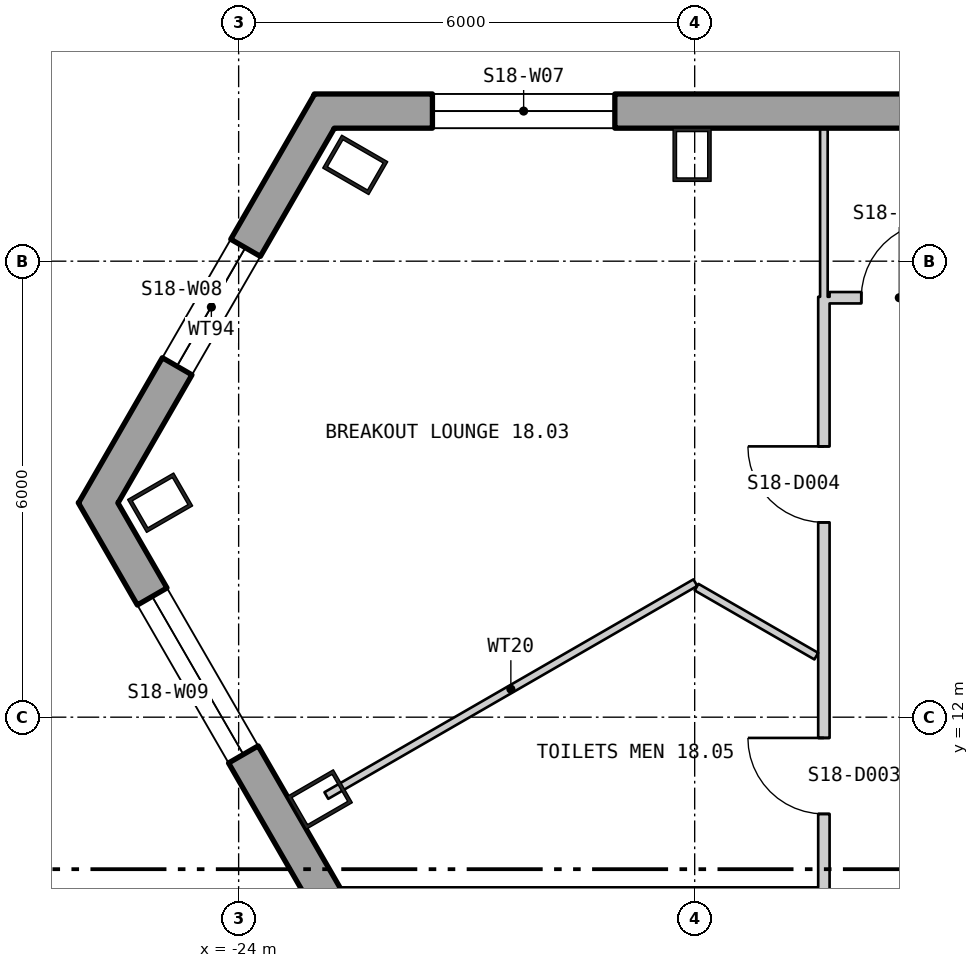
"""IFC4 building model, lengths in metres.
Left out: names, types, materials, properties, quantities, classifications, styles, units other than length and angle.
Written with IfcOpenShell. Run it as: python <this file> out.ifc"""

import sys

from ifc_helpers import new_model, si_unit, direction, frame, frame_2d, origin, origin_2d, place, context, subcontext, project, spatial, polyline, rectangle, hollow_rectangle, outline, extrude, element, fill, save


model = new_model("IFC4")
c1 = context("Model", 3, precision=1e-05, world=origin(), true_north=direction((0.0, 1.0)))
c2 = subcontext(c1, "Body", "Model", "MODEL_VIEW")
j1 = project(units=[si_unit("LENGTHUNIT", "METRE"), si_unit("PLANEANGLEUNIT", "RADIAN")], contexts=[c1])
p1 = place(None, origin())
s1 = spatial("IfcSite", under=j1, at=p1, CompositionType="ELEMENT")
p2 = place(p1, origin())
s2 = spatial("IfcBuilding", under=s1, at=p2, CompositionType="ELEMENT")
p3 = place(p2, frame((0.0, 0.0, 245.4)))
s3 = spatial("IfcBuildingStorey", under=s2, at=p3, CompositionType="ELEMENT", Elevation=245.4)
for number, where, z_axis, x_axis in (
    (1, (-18.034, 19.4, 0.0), (0.0, 0.0, 1.0), (-1.0, 0.0, 0.0)),
    (2, (-22.466, 19.267, 0.0), (0.0, 0.0, 1.0), (-0.5, -0.866, 0.0)),
    (3, (-25.033, 14.822, 0.0), (0.0, 0.0, 1.0), (0.5, -0.866, 0.0)),
    (4, (-22.932, 10.917, 0.0), (0.0, 0.0, 1.0), (0.5, -0.866, 0.0)),
):
    element("IfcColumn", number, at=place(p3, frame(where, z_axis=z_axis, x_axis=x_axis)), inside=s3, PredefinedType="COLUMN", context=c2, shape_type="SweptSolid", body=[
        extrude(hollow_rectangle(XDim=0.5, YDim=0.7, WallThickness=0.045, at=origin_2d()), origin(), (0.0, 0.0, 1.0), 3.9),
    ])
p4 = place(p3, frame((22.875, 19.975, -0.4), z_axis=(0.0, 0.0, 1.0), x_axis=(-1.0, 0.0, 0.0)))
e5 = element("IfcWall", 5, at=p4, inside=s3, PredefinedType="SOLIDWALL", context=c2, shape_type="SweptSolid", body=[
    extrude(outline(polyline([(-0.13, -0.225), (45.88, -0.225), (45.62, 0.225), (0.13, 0.225), (-0.13, -0.225)])), origin(), (0.0, 0.0, 1.0), 3.9),
])
p5 = place(p4, frame((1.425, 0.0, 1.3)))
e6 = element("IfcOpeningElement", 6, at=p5, cuts=e5, PredefinedType="OPENING", context=c2, shape_type="SweptSolid", body=[
    extrude(rectangle(XDim=2.4, YDim=2.0, at=frame_2d((1.2, 1.0))), frame((0.0, 0.235, 0.0), z_axis=(0.0, -1.0, 0.0), x_axis=(1.0, 0.0, 0.0)), (0.0, 0.0, 1.0), 0.47),
])
p6 = place(p4, frame((14.912, 0.0, 1.3)))
e7 = element("IfcOpeningElement", 7, at=p6, cuts=e5, PredefinedType="OPENING", context=c2, shape_type="SweptSolid", body=[
    extrude(rectangle(XDim=2.4, YDim=2.0, at=frame_2d((1.2, 1.0))), frame((0.0, 0.235, 0.0), z_axis=(0.0, -1.0, 0.0), x_axis=(1.0, 0.0, 0.0)), (0.0, 0.0, 1.0), 0.47),
])
p7 = place(p4, frame((19.421, 0.0, 1.3)))
e8 = element("IfcOpeningElement", 8, at=p7, cuts=e5, PredefinedType="OPENING", context=c2, shape_type="SweptSolid", body=[
    extrude(rectangle(XDim=2.4, YDim=2.0, at=frame_2d((1.2, 1.0))), frame((0.0, 0.235, 0.0), z_axis=(0.0, -1.0, 0.0), x_axis=(1.0, 0.0, 0.0)), (0.0, 0.0, 1.0), 0.47),
])
p8 = place(p4, frame((23.929, 0.0, 1.3)))
e9 = element("IfcOpeningElement", 9, at=p8, cuts=e5, PredefinedType="OPENING", context=c2, shape_type="SweptSolid", body=[
    extrude(rectangle(XDim=2.4, YDim=2.0, at=frame_2d((1.2, 1.0))), frame((0.0, 0.235, 0.0), z_axis=(0.0, -1.0, 0.0), x_axis=(1.0, 0.0, 0.0)), (0.0, 0.0, 1.0), 0.47),
])
p9 = place(p4, frame((28.438, 0.0, 1.3)))
e10 = element("IfcOpeningElement", 10, at=p9, cuts=e5, PredefinedType="OPENING", context=c2, shape_type="SweptSolid", body=[
    extrude(rectangle(XDim=2.4, YDim=2.0, at=frame_2d((1.2, 1.0))), frame((0.0, 0.235, 0.0), z_axis=(0.0, -1.0, 0.0), x_axis=(1.0, 0.0, 0.0)), (0.0, 0.0, 1.0), 0.47),
])
p10 = place(p4, frame((32.947, 0.0, 1.3)))
e11 = element("IfcOpeningElement", 11, at=p10, cuts=e5, PredefinedType="OPENING", context=c2, shape_type="SweptSolid", body=[
    extrude(rectangle(XDim=2.4, YDim=2.0, at=frame_2d((1.2, 1.0))), frame((0.0, 0.235, 0.0), z_axis=(0.0, -1.0, 0.0), x_axis=(1.0, 0.0, 0.0)), (0.0, 0.0, 1.0), 0.47),
])
p11 = place(p4, frame((41.925, 0.0, 1.3)))
e12 = element("IfcOpeningElement", 12, at=p11, cuts=e5, PredefinedType="OPENING", context=c2, shape_type="SweptSolid", body=[
    extrude(rectangle(XDim=2.4, YDim=2.0, at=frame_2d((1.2, 1.0))), frame((0.0, 0.235, 0.0), z_axis=(0.0, -1.0, 0.0), x_axis=(1.0, 0.0, 0.0)), (0.0, 0.0, 1.0), 0.47),
])
p12 = place(p3, frame((-22.871, 19.973, -0.4), z_axis=(0.0, 0.0, 1.0), x_axis=(-0.500001772576, -0.866024380385, 0.0)))
e13 = element("IfcWall", 13, at=p12, inside=s3, PredefinedType="SOLIDWALL", context=c2, shape_type="SweptSolid", body=[
    extrude(outline(polyline([(-0.13, -0.225), (6.08, -0.225), (5.82, 0.225), (0.13, 0.225), (-0.13, -0.225)])), origin(), (0.0, 0.0, 1.0), 3.9),
])
p13 = place(p12, frame((2.075, 0.0, 1.3)))
e14 = element("IfcOpeningElement", 14, at=p13, cuts=e13, PredefinedType="OPENING", context=c2, shape_type="SweptSolid", body=[
    extrude(rectangle(XDim=1.8, YDim=2.0, at=frame_2d((0.9, 1.0))), frame((0.0, 0.235, 0.0), z_axis=(0.0, -1.0, 0.0), x_axis=(1.0, 0.0, 0.0)), (0.0, 0.0, 1.0), 0.47),
])
p14 = place(p3, frame((-25.85, 14.822, -0.18), z_axis=(0.0, 0.0, 1.0), x_axis=(0.500000335318, -0.866025210188, 0.0)))
e15 = element("IfcWall", 15, at=p14, inside=s3, PredefinedType="SOLIDWALL", context=c2, shape_type="SweptSolid", body=[
    extrude(outline(polyline([(-0.13, -0.225), (45.88, -0.225), (45.62, 0.225), (0.13, 0.225), (-0.13, -0.225)])), origin(), (0.0, 0.0, 1.0), 3.68),
])
p15 = place(p14, frame((1.425, 0.0, 1.08)))
e16 = element("IfcOpeningElement", 16, at=p15, cuts=e15, PredefinedType="OPENING", context=c2, shape_type="SweptSolid", body=[
    extrude(rectangle(XDim=2.4, YDim=2.0, at=frame_2d((1.2, 1.0))), frame((0.0, 0.235, 0.0), z_axis=(0.0, -1.0, 0.0), x_axis=(1.0, 0.0, 0.0)), (0.0, 0.0, 1.0), 0.47),
])
p16 = place(p14, frame((10.403, 0.0, 1.08)))
e17 = element("IfcOpeningElement", 17, at=p16, cuts=e15, PredefinedType="OPENING", context=c2, shape_type="SweptSolid", body=[
    extrude(rectangle(XDim=2.4, YDim=2.0, at=frame_2d((1.2, 1.0))), frame((0.0, 0.235, 0.0), z_axis=(0.0, -1.0, 0.0), x_axis=(1.0, 0.0, 0.0)), (0.0, 0.0, 1.0), 0.47),
])
p17 = place(p14, frame((14.912, 0.0, 1.08)))
e18 = element("IfcOpeningElement", 18, at=p17, cuts=e15, PredefinedType="OPENING", context=c2, shape_type="SweptSolid", body=[
    extrude(rectangle(XDim=2.4, YDim=2.0, at=frame_2d((1.2, 1.0))), frame((0.0, 0.235, 0.0), z_axis=(0.0, -1.0, 0.0), x_axis=(1.0, 0.0, 0.0)), (0.0, 0.0, 1.0), 0.47),
])
p18 = place(p14, frame((19.421, 0.0, 1.08)))
e19 = element("IfcOpeningElement", 19, at=p18, cuts=e15, PredefinedType="OPENING", context=c2, shape_type="SweptSolid", body=[
    extrude(rectangle(XDim=2.4, YDim=2.0, at=frame_2d((1.2, 1.0))), frame((0.0, 0.235, 0.0), z_axis=(0.0, -1.0, 0.0), x_axis=(1.0, 0.0, 0.0)), (0.0, 0.0, 1.0), 0.47),
])
p19 = place(p14, frame((23.929, 0.0, 1.08)))
e20 = element("IfcOpeningElement", 20, at=p19, cuts=e15, PredefinedType="OPENING", context=c2, shape_type="SweptSolid", body=[
    extrude(rectangle(XDim=2.4, YDim=2.0, at=frame_2d((1.2, 1.0))), frame((0.0, 0.235, 0.0), z_axis=(0.0, -1.0, 0.0), x_axis=(1.0, 0.0, 0.0)), (0.0, 0.0, 1.0), 0.47),
])
p20 = place(p14, frame((28.438, 0.0, 1.08)))
e21 = element("IfcOpeningElement", 21, at=p20, cuts=e15, PredefinedType="OPENING", context=c2, shape_type="SweptSolid", body=[
    extrude(rectangle(XDim=2.4, YDim=2.0, at=frame_2d((1.2, 1.0))), frame((0.0, 0.235, 0.0), z_axis=(0.0, -1.0, 0.0), x_axis=(1.0, 0.0, 0.0)), (0.0, 0.0, 1.0), 0.47),
])
p21 = place(p14, frame((32.947, 0.0, 1.08)))
e22 = element("IfcOpeningElement", 22, at=p21, cuts=e15, PredefinedType="OPENING", context=c2, shape_type="SweptSolid", body=[
    extrude(rectangle(XDim=2.4, YDim=2.0, at=frame_2d((1.2, 1.0))), frame((0.0, 0.235, 0.0), z_axis=(0.0, -1.0, 0.0), x_axis=(1.0, 0.0, 0.0)), (0.0, 0.0, 1.0), 0.47),
])
p22 = place(p14, frame((37.455, 0.0, 1.08)))
e23 = element("IfcOpeningElement", 23, at=p22, cuts=e15, PredefinedType="OPENING", context=c2, shape_type="SweptSolid", body=[
    extrude(rectangle(XDim=2.4, YDim=2.0, at=frame_2d((1.2, 1.0))), frame((0.0, 0.235, 0.0), z_axis=(0.0, -1.0, 0.0), x_axis=(1.0, 0.0, 0.0)), (0.0, 0.0, 1.0), 0.47),
])
p23 = place(p14, frame((41.925, 0.0, 1.08)))
e24 = element("IfcOpeningElement", 24, at=p23, cuts=e15, PredefinedType="OPENING", context=c2, shape_type="SweptSolid", body=[
    extrude(rectangle(XDim=2.4, YDim=2.0, at=frame_2d((1.2, 1.0))), frame((0.0, 0.235, 0.0), z_axis=(0.0, -1.0, 0.0), x_axis=(1.0, 0.0, 0.0)), (0.0, 0.0, 1.0), 0.47),
])
p24 = place(p3, frame((-22.846, 10.969, 0.0), z_axis=(0.0, 0.0, 1.0), x_axis=(0.866182615826, 0.499727601839, 0.0)))
e25 = element("IfcWall", 25, at=p24, inside=s3, PredefinedType="PARTITIONING", context=c2, shape_type="SweptSolid", body=[
    extrude(rectangle(XDim=5.605, YDim=0.1, at=frame_2d((2.803, 0.0))), origin(), (0.0, 0.0, 1.0), 3.7),
])
p25 = place(p3, frame((-22.638, 9.711, 0.0), z_axis=(0.0, 0.0, 1.0), x_axis=(1.0, 0.0, 0.0)))
e26 = element("IfcWall", 26, at=p25, inside=s3, PredefinedType="PARTITIONING", context=c2, shape_type="SweptSolid", body=[
    extrude(rectangle(XDim=6.263, YDim=0.1, at=frame_2d((3.131, 0.0))), origin(), (0.0, 0.0, 1.0), 3.7),
])
p26 = place(p3, frame((-17.975, 13.711, 0.0), z_axis=(0.0, 0.0, 1.0), x_axis=(0.866341220787, -0.499452589508, 0.0)))
e27 = element("IfcWall", 27, at=p26, inside=s3, PredefinedType="PARTITIONING", context=c2, shape_type="SweptSolid", body=[
    extrude(rectangle(XDim=1.818, YDim=0.1, at=frame_2d((0.909, 0.0))), origin(), (0.0, 0.0, 1.0), 3.7),
])
p27 = place(p3, frame((-16.3, 2.125, 0.0), z_axis=(0.0, 0.0, 1.0), x_axis=(0.0, 1.0, 0.0)))
e28 = element("IfcWall", 28, at=p27, inside=s3, PredefinedType="PARTITIONING", context=c2, shape_type="SweptSolid", body=[
    extrude(rectangle(XDim=15.406, YDim=0.15, at=frame_2d((7.703, 0.0))), origin(), (0.0, 0.0, 1.0), 3.7),
])
p28 = place(p27, frame((2.576, 0.0, 0.0)))
e29 = element("IfcOpeningElement", 29, at=p28, cuts=e28, PredefinedType="OPENING", context=c2, shape_type="SweptSolid", body=[
    extrude(rectangle(XDim=1.0, YDim=2.1, at=frame_2d((0.5, 1.05))), frame((0.0, 0.085, 0.0), z_axis=(0.0, -1.0, 0.0), x_axis=(1.0, 0.0, 0.0)), (0.0, 0.0, 1.0), 0.17),
])
p29 = place(p27, frame((5.24, 0.0, 0.0)))
e30 = element("IfcOpeningElement", 30, at=p29, cuts=e28, PredefinedType="OPENING", context=c2, shape_type="SweptSolid", body=[
    extrude(rectangle(XDim=1.0, YDim=2.1, at=frame_2d((0.5, 1.05))), frame((0.0, 0.085, 0.0), z_axis=(0.0, -1.0, 0.0), x_axis=(1.0, 0.0, 0.0)), (0.0, 0.0, 1.0), 0.17),
])
p30 = place(p27, frame((8.602, 0.0, 0.0)))
e31 = element("IfcOpeningElement", 31, at=p30, cuts=e28, PredefinedType="OPENING", context=c2, shape_type="SweptSolid", body=[
    extrude(rectangle(XDim=1.0, YDim=2.1, at=frame_2d((0.5, 1.05))), frame((0.0, 0.085, 0.0), z_axis=(0.0, -1.0, 0.0), x_axis=(1.0, 0.0, 0.0)), (0.0, 0.0, 1.0), 0.17),
])
p31 = place(p27, frame((12.438, 0.0, 0.0)))
e32 = element("IfcOpeningElement", 32, at=p31, cuts=e28, PredefinedType="OPENING", context=c2, shape_type="SweptSolid", body=[
    extrude(rectangle(XDim=1.0, YDim=2.1, at=frame_2d((0.5, 1.05))), frame((0.0, 0.085, 0.0), z_axis=(0.0, -1.0, 0.0), x_axis=(1.0, 0.0, 0.0)), (0.0, 0.0, 1.0), 0.17),
])
p32 = place(p3, frame((-16.3, 17.531, 0.0), z_axis=(0.0, 0.0, 1.0), x_axis=(0.0, 1.0, 0.0)))
e33 = element("IfcWall", 33, at=p32, inside=s3, PredefinedType="PARTITIONING", context=c2, shape_type="SweptSolid", body=[
    extrude(rectangle(XDim=2.219, YDim=0.1, at=frame_2d((1.109, 0.0))), origin(), (0.0, 0.0, 1.0), 3.7),
])
p33 = place(p3, frame((-16.225, 17.519, 0.0), z_axis=(0.0, 0.0, 1.0), x_axis=(1.0, 0.0, 0.0)))
e34 = element("IfcWall", 34, at=p33, inside=s3, PredefinedType="PARTITIONING", context=c2, shape_type="SweptSolid", body=[
    extrude(rectangle(XDim=1.725, YDim=0.15, at=frame_2d((0.863, 0.0))), origin(), (0.0, 0.0, 1.0), 3.7),
])
p34 = place(p33, frame((0.417, 0.0, 0.0)))
e35 = element("IfcOpeningElement", 35, at=p34, cuts=e34, PredefinedType="OPENING", context=c2, shape_type="SweptSolid", body=[
    extrude(rectangle(XDim=1.0, YDim=2.1, at=frame_2d((0.5, 1.05))), frame((0.0, 0.085, 0.0), z_axis=(0.0, -1.0, 0.0), x_axis=(1.0, 0.0, 0.0)), (0.0, 0.0, 1.0), 0.17),
])
p35 = place(p11, origin())
e36 = element("IfcWindow", 36, at=p35, inside=s3, PartitioningType="SINGLE_PANEL", PredefinedType="WINDOW", context=c2, shape_type="SweptSolid", body=[
    extrude(rectangle(XDim=2.4, YDim=2.0, at=frame_2d((1.2, 1.0))), frame((0.0, 0.105, 0.0), z_axis=(0.0, -1.0, 0.0), x_axis=(1.0, 0.0, 0.0)), (0.0, 0.0, 1.0), 0.06),
])
fill(e12, e36)
p36 = place(p13, origin())
e37 = element("IfcWindow", 37, at=p36, inside=s3, PartitioningType="SINGLE_PANEL", PredefinedType="WINDOW", context=c2, shape_type="SweptSolid", body=[
    extrude(rectangle(XDim=1.8, YDim=2.0, at=frame_2d((0.9, 1.0))), frame((0.0, 0.105, 0.0), z_axis=(0.0, -1.0, 0.0), x_axis=(1.0, 0.0, 0.0)), (0.0, 0.0, 1.0), 0.06),
])
fill(e14, e37)
p37 = place(p15, origin())
e38 = element("IfcWindow", 38, at=p37, inside=s3, PartitioningType="SINGLE_PANEL", PredefinedType="WINDOW", context=c2, shape_type="SweptSolid", body=[
    extrude(rectangle(XDim=2.4, YDim=2.0, at=frame_2d((1.2, 1.0))), frame((0.0, 0.105, 0.0), z_axis=(0.0, -1.0, 0.0), x_axis=(1.0, 0.0, 0.0)), (0.0, 0.0, 1.0), 0.06),
])
fill(e16, e38)
p38 = place(p30, origin())
e39 = element("IfcDoor", 39, at=p38, inside=s3, OperationType="SINGLE_SWING_LEFT", PredefinedType="DOOR", context=c2, shape_type="SweptSolid", body=[
    extrude(rectangle(XDim=1.0, YDim=2.1, at=frame_2d((0.5, 1.05))), frame((0.0, 0.025, 0.0), z_axis=(0.0, -1.0, 0.0), x_axis=(1.0, 0.0, 0.0)), (0.0, 0.0, 1.0), 0.05),
])
fill(e31, e39)
p39 = place(p31, origin())
e40 = element("IfcDoor", 40, at=p39, inside=s3, OperationType="SINGLE_SWING_LEFT", PredefinedType="DOOR", context=c2, shape_type="SweptSolid", body=[
    extrude(rectangle(XDim=1.0, YDim=2.1, at=frame_2d((0.5, 1.05))), frame((0.0, 0.025, 0.0), z_axis=(0.0, -1.0, 0.0), x_axis=(1.0, 0.0, 0.0)), (0.0, 0.0, 1.0), 0.05),
])
fill(e32, e40)
p40 = place(p34, origin())
e41 = element("IfcDoor", 41, at=p40, inside=s3, OperationType="SINGLE_SWING_LEFT", PredefinedType="DOOR", context=c2, shape_type="SweptSolid", body=[
    extrude(rectangle(XDim=1.0, YDim=2.1, at=frame_2d((0.5, 1.05))), frame((0.0, 0.025, 0.0), z_axis=(0.0, -1.0, 0.0), x_axis=(1.0, 0.0, 0.0)), (0.0, 0.0, 1.0), 0.05),
])
fill(e35, e41)
save(model, sys.argv[1])
